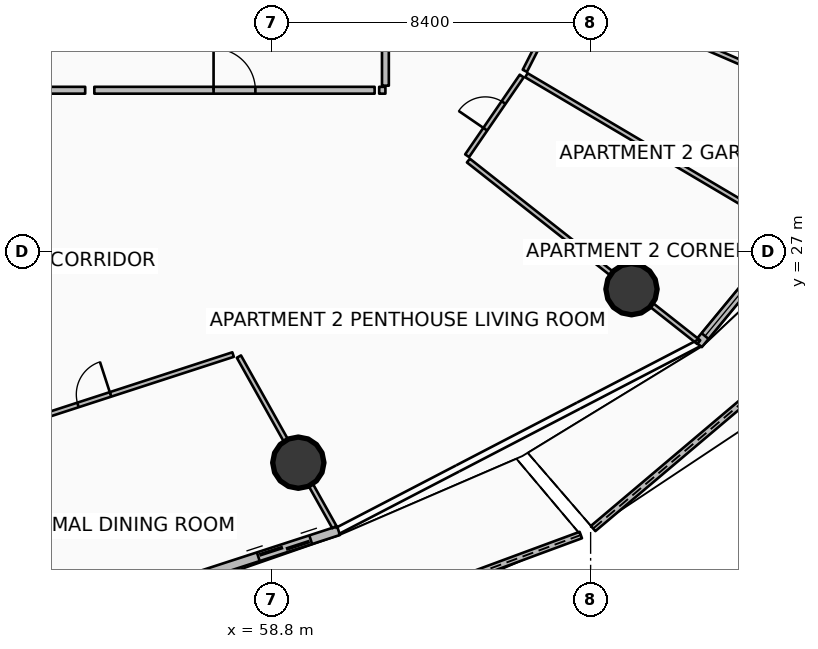
"""IFC4 building model, lengths in metres.
Left out: names, types, materials, properties, quantities, classifications, styles, units other than length and angle.
Written with IfcOpenShell. Run it as: python <this file> out.ifc"""

import sys

from ifc_helpers import new_model, si_unit, direction, frame, frame_2d, origin, origin_2d, place, context, subcontext, project, spatial, polyline, rectangle, circle, outline, extrude, element, fill, save


model = new_model("IFC4")
c1 = context("Model", 3, precision=1e-05, world=origin(), true_north=direction((0.0, 1.0)))
c2 = subcontext(c1, "Body", "Model", "MODEL_VIEW")
j1 = project(units=[si_unit("LENGTHUNIT", "METRE"), si_unit("PLANEANGLEUNIT", "RADIAN")], contexts=[c1])
p1 = place(None, origin())
s1 = spatial("IfcSite", under=j1, at=p1, CompositionType="ELEMENT")
p2 = place(p1, origin())
s2 = spatial("IfcBuilding", under=s1, at=p2, CompositionType="ELEMENT")
p3 = place(p2, frame((0.0, 0.0, 37.65)))
s3 = spatial("IfcBuildingStorey", under=s2, at=p3, CompositionType="ELEMENT", Elevation=37.65)
for number, where, z_axis, x_axis in (
    (1, (59.508, 21.45, 0.0), (0.0, 0.0, 1.0), (1.0, 0.0, 0.0)),
    (2, (68.276, 26.016, 0.0), (0.0, 0.0, 1.0), (1.0, 0.0, 0.0)),
):
    element("IfcColumn", number, at=place(p3, frame(where, z_axis=z_axis, x_axis=x_axis)), inside=s3, PredefinedType="COLUMN", context=c2, shape_type="SweptSolid", body=[
        extrude(circle(Radius=0.675, at=origin_2d()), origin(), (0.0, 0.0, 1.0), 3.5),
    ])
p4 = place(p3, frame((56.656, 15.746, 0.0), z_axis=(0.0, 0.0, 1.0), x_axis=(0.938003942123, 0.346624587358, 0.0)))
e3 = element("IfcWall", 3, at=p4, inside=s3, PredefinedType="PARAPET", context=c2, shape_type="SweptSolid", body=[
    extrude(outline(polyline([(0.0, 0.0), (10.964, 0.0), (10.964, 1.86), (5.482, 1.798), (0.0, 1.632), (0.0, 0.0)])), frame((0.0, 0.09, 0.0), z_axis=(0.0, -1.0, 0.0), x_axis=(1.0, 0.0, 0.0)), (0.0, 0.0, 1.0), 0.18),
])
p5 = place(p3, frame((67.267, 19.719, 0.0), z_axis=(0.0, 0.0, 1.0), x_axis=(0.763702211542, 0.645568688898, 0.0)))
e4 = element("IfcWall", 4, at=p5, inside=s3, PredefinedType="PARAPET", context=c2, shape_type="SweptSolid", body=[
    extrude(outline(polyline([(0.0, 0.0), (11.927, 0.0), (11.927, 1.632), (5.963, 1.798), (0.0, 1.86), (0.0, 0.0)])), frame((0.0, 0.09, 0.0), z_axis=(0.0, -1.0, 0.0), x_axis=(1.0, 0.0, 0.0)), (0.0, 0.0, 1.0), 0.18),
])
p6 = place(p3, frame((50.964, 16.542, 0.0), z_axis=(0.0, 0.0, 1.0), x_axis=(0.951054679225, 0.309022648238, 0.0)))
e5 = element("IfcWall", 5, at=p6, inside=s3, PredefinedType="SOLIDWALL", context=c2, shape_type="SweptSolid", body=[
    extrude(rectangle(XDim=10.097, YDim=0.24, at=frame_2d((5.048, 0.0))), origin(), (0.0, 0.0, 1.0), 2.45),
])
p7 = place(p6, frame((7.877, 0.0, 0.0)))
e6 = element("IfcOpeningElement", 6, at=p7, cuts=e5, PredefinedType="OPENING", context=c2, shape_type="SweptSolid", body=[
    extrude(rectangle(XDim=1.45, YDim=2.15, at=frame_2d((0.725, 1.075))), frame((0.0, 0.13, 0.0), z_axis=(0.0, -1.0, 0.0), x_axis=(1.0, 0.0, 0.0)), (0.0, 0.0, 1.0), 0.26),
])
p8 = place(p6, frame((0.28, 0.0, 0.65)))
e7 = element("IfcOpeningElement", 7, at=p8, cuts=e5, PredefinedType="OPENING", context=c2, shape_type="SweptSolid", body=[
    extrude(rectangle(XDim=1.6, YDim=1.5, at=frame_2d((0.8, 0.75))), frame((0.0, 0.13, 0.0), z_axis=(0.0, -1.0, 0.0), x_axis=(1.0, 0.0, 0.0)), (0.0, 0.0, 1.0), 0.26),
])
p9 = place(p3, frame((70.033, 24.567, 0.0), z_axis=(0.0, 0.0, 1.0), x_axis=(0.636674332663, 0.771132799281, 0.0)))
e8 = element("IfcWall", 8, at=p9, inside=s3, PredefinedType="SOLIDWALL", context=c2, shape_type="SweptSolid", body=[
    extrude(rectangle(XDim=11.851, YDim=0.24, at=frame_2d((5.926, 0.0))), origin(), (0.0, 0.0, 1.0), 2.45),
])
p10 = place(p9, frame((9.631, 0.0, 0.0)))
e9 = element("IfcOpeningElement", 9, at=p10, cuts=e8, PredefinedType="OPENING", context=c2, shape_type="SweptSolid", body=[
    extrude(rectangle(XDim=1.45, YDim=2.15, at=frame_2d((0.725, 1.075))), frame((0.0, 0.13, 0.0), z_axis=(0.0, -1.0, 0.0), x_axis=(1.0, 0.0, 0.0)), (0.0, 0.0, 1.0), 0.26),
])
p11 = place(p9, frame((0.28, 0.0, 0.65)))
e10 = element("IfcOpeningElement", 10, at=p11, cuts=e8, PredefinedType="OPENING", context=c2, shape_type="SweptSolid", body=[
    extrude(rectangle(XDim=1.6, YDim=1.5, at=frame_2d((0.8, 0.75))), frame((0.0, 0.13, 0.0), z_axis=(0.0, -1.0, 0.0), x_axis=(1.0, 0.0, 0.0)), (0.0, 0.0, 1.0), 0.26),
])
p12 = place(p3, frame((54.14, 31.25, 0.0), z_axis=(0.0, 0.0, 1.0), x_axis=(1.0, 0.0, 0.0)))
e11 = element("IfcWall", 11, at=p12, inside=s3, PredefinedType="PARTITIONING", context=c2, shape_type="SweptSolid", body=[
    extrude(rectangle(XDim=7.376, YDim=0.18, at=frame_2d((3.688, 0.0))), origin(), (0.0, 0.0, 1.0), 2.867),
])
p13 = place(p12, frame((3.138, 0.0, 0.0)))
e12 = element("IfcOpeningElement", 12, at=p13, cuts=e11, PredefinedType="OPENING", context=c2, shape_type="SweptSolid", body=[
    extrude(rectangle(XDim=1.1, YDim=2.1, at=frame_2d((0.55, 1.05))), frame((0.0, 0.1, 0.0), z_axis=(0.0, -1.0, 0.0), x_axis=(1.0, 0.0, 0.0)), (0.0, 0.0, 1.0), 0.2),
])
p14 = place(p3, frame((49.392, 31.25, 0.0), z_axis=(0.0, 0.0, 1.0), x_axis=(1.0, 0.0, 0.0)))
e13 = element("IfcWall", 13, at=p14, inside=s3, PredefinedType="PARTITIONING", context=c2, shape_type="SweptSolid", body=[
    extrude(rectangle(XDim=4.508, YDim=0.18, at=frame_2d((2.254, 0.0))), origin(), (0.0, 0.0, 1.0), 2.867),
])
p15 = place(p3, frame((57.945, 24.242, 0.0), z_axis=(0.0, 0.0, 1.0), x_axis=(0.488630834306, -0.872490634772, 0.0)))
e14 = element("IfcWall", 14, at=p15, inside=s3, PredefinedType="PARTITIONING", context=c2, shape_type="SweptSolid", body=[
    extrude(rectangle(XDim=5.143, YDim=0.125, at=frame_2d((2.571, 0.0))), origin(), (0.0, 0.0, 1.0), 2.867),
])
p16 = place(p3, frame((50.485, 21.921, 0.0), z_axis=(0.0, 0.0, 1.0), x_axis=(0.951055318468, 0.309020680883, 0.0)))
e15 = element("IfcWall", 15, at=p16, inside=s3, PredefinedType="PARTITIONING", context=c2, shape_type="SweptSolid", body=[
    extrude(rectangle(XDim=7.682, YDim=0.125, at=frame_2d((3.841, 0.0))), origin(), (0.0, 0.0, 1.0), 2.867),
])
p17 = place(p16, frame((3.391, 0.0, 0.0)))
e16 = element("IfcOpeningElement", 16, at=p17, cuts=e15, PredefinedType="OPENING", context=c2, shape_type="SweptSolid", body=[
    extrude(rectangle(XDim=0.9, YDim=2.08, at=frame_2d((0.45, 1.04))), frame((0.0, 0.073, 0.0), z_axis=(0.0, -1.0, 0.0), x_axis=(1.0, 0.0, 0.0)), (0.0, 0.0, 1.0), 0.145),
])
p18 = place(p3, frame((61.636, 31.25, 0.0), z_axis=(0.0, 0.0, 1.0), x_axis=(1.0, 0.0, 0.0)))
e17 = element("IfcWall", 17, at=p18, inside=s3, PredefinedType="PARTITIONING", context=c2, shape_type="SweptSolid", body=[
    extrude(rectangle(XDim=0.164, YDim=0.18, at=frame_2d((0.082, 0.0))), origin(), (0.0, 0.0, 1.0), 2.867),
])
p19 = place(p3, frame((61.8, 31.37, 0.0), z_axis=(0.0, 0.0, 1.0), x_axis=(0.0, 1.0, 0.0)))
e18 = element("IfcWall", 18, at=p19, inside=s3, PredefinedType="PARTITIONING", context=c2, shape_type="SweptSolid", body=[
    extrude(rectangle(XDim=6.618, YDim=0.18, at=frame_2d((3.309, 0.0))), origin(), (0.0, 0.0, 1.0), 2.867),
])
p20 = place(p3, frame((63.983, 29.4, 0.0), z_axis=(0.0, 0.0, 1.0), x_axis=(0.785322984339, -0.619086270457, 0.0)))
e19 = element("IfcWall", 19, at=p20, inside=s3, PredefinedType="PARTITIONING", context=c2, shape_type="SweptSolid", body=[
    extrude(rectangle(XDim=7.719, YDim=0.125, at=frame_2d((3.86, 0.0))), origin(), (0.0, 0.0, 1.0), 2.867),
])
p21 = place(p3, frame((65.51, 31.645, 0.0), z_axis=(0.0, 0.0, 1.0), x_axis=(0.86074163886, -0.509042072065, 0.0)))
e20 = element("IfcWall", 20, at=p21, inside=s3, PredefinedType="PARTITIONING", context=c2, shape_type="SweptSolid", body=[
    extrude(rectangle(XDim=7.968, YDim=0.125, at=frame_2d((3.984, 0.0))), origin(), (0.0, 0.0, 1.0), 2.94),
])
p22 = place(p3, frame((66.67, 33.921, 0.0), z_axis=(0.0, 0.0, 1.0), x_axis=(0.917747697885, -0.397163899451, 0.0)))
e21 = element("IfcWall", 21, at=p22, inside=s3, PredefinedType="PARTITIONING", context=c2, shape_type="SweptSolid", body=[
    extrude(rectangle(XDim=8.775, YDim=0.125, at=frame_2d((4.387, 0.0))), origin(), (0.0, 0.0, 1.0), 2.94),
])
p23 = place(p3, frame((63.95, 29.528, 0.0), z_axis=(0.0, 0.0, 1.0), x_axis=(0.565358509176, 0.824845292223, 0.0)))
e22 = element("IfcWall", 22, at=p23, inside=s3, PredefinedType="PARTITIONING", context=c2, shape_type="SweptSolid", body=[
    extrude(rectangle(XDim=2.542, YDim=0.125, at=frame_2d((1.271, 0.0))), origin(), (0.0, 0.0, 1.0), 2.867),
])
p24 = place(p23, frame((0.846, 0.0, 0.0)))
e23 = element("IfcOpeningElement", 23, at=p24, cuts=e22, PredefinedType="OPENING", context=c2, shape_type="SweptSolid", body=[
    extrude(rectangle(XDim=0.85, YDim=2.06, at=frame_2d((0.425, 1.03))), frame((0.0, 0.073, 0.0), z_axis=(0.0, -1.0, 0.0), x_axis=(1.0, 0.0, 0.0)), (0.0, 0.0, 1.0), 0.145),
])
p25 = place(p3, frame((65.469, 31.762, 0.0), z_axis=(0.0, 0.0, 1.0), x_axis=(0.45400250644, 0.891000406367, 0.0)))
e24 = element("IfcWall", 24, at=p25, inside=s3, PredefinedType="PARTITIONING", context=c2, shape_type="SweptSolid", body=[
    extrude(rectangle(XDim=2.383, YDim=0.125, at=frame_2d((1.192, 0.0))), origin(), (0.0, 0.0, 1.0), 2.94),
])
p26 = place(p25, frame((0.767, 0.0, 0.0)))
e25 = element("IfcOpeningElement", 25, at=p26, cuts=e24, PredefinedType="OPENING", context=c2, shape_type="SweptSolid", body=[
    extrude(rectangle(XDim=0.85, YDim=2.06, at=frame_2d((0.425, 1.03))), frame((0.0, 0.073, 0.0), z_axis=(0.0, -1.0, 0.0), x_axis=(1.0, 0.0, 0.0)), (0.0, 0.0, 1.0), 0.145),
])
p27 = place(p7, origin())
e26 = element("IfcDoor", 26, at=p27, inside=s3, OperationType="DOUBLE_DOOR_SLIDING", PredefinedType="DOOR", context=c2, shape_type="SweptSolid", body=[
    extrude(rectangle(XDim=1.45, YDim=2.15, at=frame_2d((0.725, 1.075))), frame((0.0, 0.025, 0.0), z_axis=(0.0, -1.0, 0.0), x_axis=(1.0, 0.0, 0.0)), (0.0, 0.0, 1.0), 0.05),
])
fill(e6, e26)
p28 = place(p11, origin())
e27 = element("IfcWindow", 27, at=p28, inside=s3, PartitioningType="SINGLE_PANEL", PredefinedType="WINDOW", context=c2, shape_type="SweptSolid", body=[
    extrude(rectangle(XDim=1.6, YDim=1.5, at=frame_2d((0.8, 0.75))), frame((0.0, 0.03, 0.0), z_axis=(0.0, -1.0, 0.0), x_axis=(1.0, 0.0, 0.0)), (0.0, 0.0, 1.0), 0.06),
])
fill(e10, e27)
p29 = place(p13, origin())
e28 = element("IfcDoor", 28, at=p29, inside=s3, OperationType="SINGLE_SWING_LEFT", PredefinedType="DOOR", context=c2, shape_type="SweptSolid", body=[
    extrude(rectangle(XDim=1.1, YDim=2.1, at=frame_2d((0.55, 1.05))), frame((0.0, 0.025, 0.0), z_axis=(0.0, -1.0, 0.0), x_axis=(1.0, 0.0, 0.0)), (0.0, 0.0, 1.0), 0.05),
])
fill(e12, e28)
p30 = place(p17, origin())
e29 = element("IfcDoor", 29, at=p30, inside=s3, OperationType="SINGLE_SWING_RIGHT", PredefinedType="DOOR", context=c2, shape_type="SweptSolid", body=[
    extrude(rectangle(XDim=0.9, YDim=2.08, at=frame_2d((0.45, 1.04))), frame((0.0, 0.025, 0.0), z_axis=(0.0, -1.0, 0.0), x_axis=(1.0, 0.0, 0.0)), (0.0, 0.0, 1.0), 0.05),
])
fill(e16, e29)
p31 = place(p24, origin())
e30 = element("IfcDoor", 30, at=p31, inside=s3, OperationType="SINGLE_SWING_LEFT", PredefinedType="DOOR", context=c2, shape_type="SweptSolid", body=[
    extrude(rectangle(XDim=0.85, YDim=2.06, at=frame_2d((0.425, 1.03))), frame((0.0, 0.025, 0.0), z_axis=(0.0, -1.0, 0.0), x_axis=(1.0, 0.0, 0.0)), (0.0, 0.0, 1.0), 0.05),
])
fill(e23, e30)
save(model, sys.argv[1])
